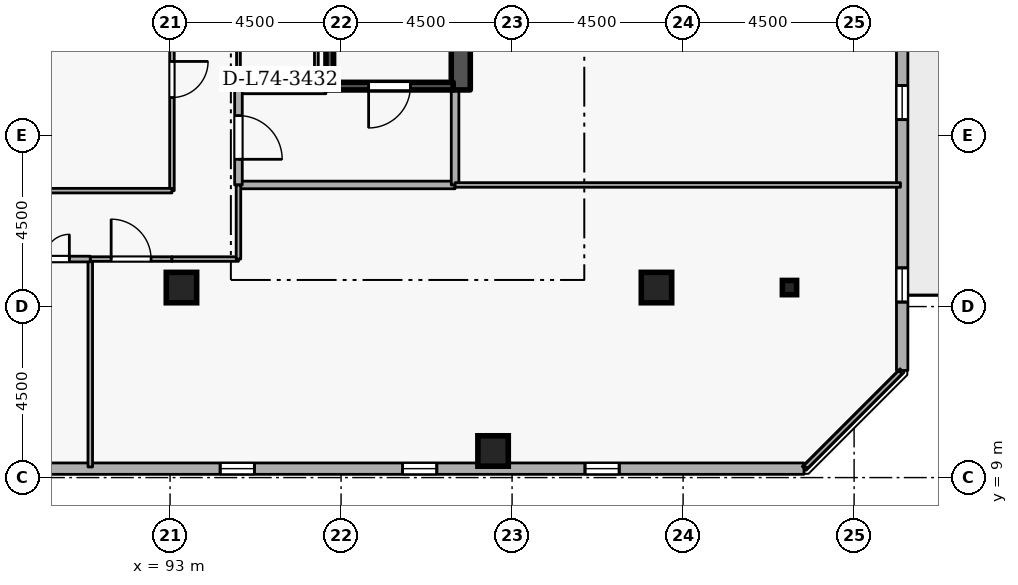
"""IFC4 building model, lengths in metres.
Left out: names, types, materials, properties, quantities, classifications, styles, units other than length and angle.
Written with IfcOpenShell. Run it as: python <this file> out.ifc"""

import sys

from ifc_helpers import new_model, si_unit, direction, frame, frame_2d, origin, origin_2d, place, context, subcontext, project, spatial, rectangle, i_section, extrude, element, fill, save


model = new_model("IFC4")
c1 = context("Model", 3, precision=1e-05, world=origin(), true_north=direction((0.0, 1.0)))
c2 = subcontext(c1, "Body", "Model", "MODEL_VIEW")
j1 = project(units=[si_unit("LENGTHUNIT", "METRE"), si_unit("PLANEANGLEUNIT", "RADIAN")], contexts=[c1])
p1 = place(None, origin())
s1 = spatial("IfcSite", under=j1, at=p1, CompositionType="ELEMENT")
p2 = place(p1, origin())
s2 = spatial("IfcBuilding", under=s1, at=p2, CompositionType="ELEMENT")
p3 = place(p2, frame((0.0, 0.0, 276.3)))
s3 = spatial("IfcBuildingStorey", under=s2, at=p3, CompositionType="ELEMENT", Elevation=276.3)
p4 = place(p3, frame((100.65, 19.2, 0.0), z_axis=(0.0, 0.0, 1.0), x_axis=(0.0, 1.0, 0.0)))
e1 = element("IfcWall", 1, at=p4, inside=s3, PredefinedType="SHEAR", context=c2, shape_type="SweptSolid", body=[
    extrude(rectangle(XDim=15.6, YDim=0.5, at=frame_2d((7.8, 0.0))), origin(), (0.0, 0.0, 1.0), 3.6),
])
for number, where, z_axis, x_axis in (
    (2, (105.8, 14.0, 0.0), (0.0, 0.0, 1.0), (1.0, 0.0, 0.0)),
    (3, (101.5, 9.7, 0.0), (0.0, 0.0, 1.0), (1.0, 0.0, 0.0)),
    (4, (93.3, 14.0, 0.0), (0.0, 0.0, 1.0), (1.0, 0.0, 0.0)),
):
    element("IfcColumn", number, at=place(p3, frame(where, z_axis=z_axis, x_axis=x_axis)), inside=s3, PredefinedType="COLUMN", context=c2, shape_type="SweptSolid", body=[
        extrude(rectangle(XDim=0.8, YDim=0.8, at=origin_2d()), origin(), (0.0, 0.0, 1.0), 3.6),
    ])
p5 = place(p3, frame((109.3, 14.0, 0.0), z_axis=(0.0, 0.0, 1.0), x_axis=(1.0, 0.0, 0.0)))
e5 = element("IfcColumn", 5, at=p5, inside=s3, PredefinedType="COLUMN", context=c2, shape_type="SweptSolid", body=[
    extrude(i_section(OverallWidth=0.375, OverallDepth=0.375, WebThickness=0.017, FlangeThickness=0.027, FilletRadius=0.015, at=origin_2d()), origin(), (0.0, 0.0, 1.0), 3.6),
])
p6 = place(p3, frame((73.319, 9.235, 0.0), z_axis=(0.0, 0.0, 1.0), x_axis=(1.0, 0.0, 0.0)))
e6 = element("IfcWall", 6, at=p6, inside=s3, PredefinedType="STANDARD", context=c2, shape_type="SweptSolid", body=[
    extrude(rectangle(XDim=36.363, YDim=0.3, at=frame_2d((18.181, 0.0))), origin(), (0.0, 0.0, 1.0), 2.66),
])
p7 = place(p6, frame((6.6, 0.0, 0.72)))
e7 = element("IfcOpeningElement", 7, at=p7, cuts=e6, PredefinedType="OPENING", context=c2, shape_type="SweptSolid", body=[
    extrude(rectangle(XDim=0.9, YDim=1.75, at=frame_2d((0.45, 0.875))), frame((0.0, 0.16, 0.0), z_axis=(0.0, -1.0, 0.0), x_axis=(1.0, 0.0, 0.0)), (0.0, 0.0, 1.0), 0.32),
])
p8 = place(p6, frame((11.4, 0.0, 0.72)))
e8 = element("IfcOpeningElement", 8, at=p8, cuts=e6, PredefinedType="OPENING", context=c2, shape_type="SweptSolid", body=[
    extrude(rectangle(XDim=0.9, YDim=1.75, at=frame_2d((0.45, 0.875))), frame((0.0, 0.16, 0.0), z_axis=(0.0, -1.0, 0.0), x_axis=(1.0, 0.0, 0.0)), (0.0, 0.0, 1.0), 0.32),
])
p9 = place(p6, frame((21.0, 0.0, 0.72)))
e9 = element("IfcOpeningElement", 9, at=p9, cuts=e6, PredefinedType="OPENING", context=c2, shape_type="SweptSolid", body=[
    extrude(rectangle(XDim=0.9, YDim=1.75, at=frame_2d((0.45, 0.875))), frame((0.0, 0.16, 0.0), z_axis=(0.0, -1.0, 0.0), x_axis=(1.0, 0.0, 0.0)), (0.0, 0.0, 1.0), 0.32),
])
p10 = place(p6, frame((25.8, 0.0, 0.72)))
e10 = element("IfcOpeningElement", 10, at=p10, cuts=e6, PredefinedType="OPENING", context=c2, shape_type="SweptSolid", body=[
    extrude(rectangle(XDim=0.9, YDim=1.75, at=frame_2d((0.45, 0.875))), frame((0.0, 0.16, 0.0), z_axis=(0.0, -1.0, 0.0), x_axis=(1.0, 0.0, 0.0)), (0.0, 0.0, 1.0), 0.32),
])
p11 = place(p6, frame((30.6, 0.0, 0.72)))
e11 = element("IfcOpeningElement", 11, at=p11, cuts=e6, PredefinedType="OPENING", context=c2, shape_type="SweptSolid", body=[
    extrude(rectangle(XDim=0.9, YDim=1.75, at=frame_2d((0.45, 0.875))), frame((0.0, 0.16, 0.0), z_axis=(0.0, -1.0, 0.0), x_axis=(1.0, 0.0, 0.0)), (0.0, 0.0, 1.0), 0.32),
])
p12 = place(p3, frame((112.265, 11.819, 0.0), z_axis=(0.0, 0.0, 1.0), x_axis=(0.0, 1.0, 0.0)))
e12 = element("IfcWall", 12, at=p12, inside=s3, PredefinedType="STANDARD", context=c2, shape_type="SweptSolid", body=[
    extrude(rectangle(XDim=36.363, YDim=0.3, at=frame_2d((18.181, 0.0))), origin(), (0.0, 0.0, 1.0), 2.66),
])
p13 = place(p12, frame((23.581, 0.0, 0.0)))
e13 = element("IfcOpeningElement", 13, at=p13, cuts=e12, PredefinedType="OPENING", context=c2, shape_type="SweptSolid", body=[
    extrude(rectangle(XDim=1.0, YDim=2.08, at=frame_2d((0.5, 1.04))), frame((0.0, 0.16, 0.0), z_axis=(0.0, -1.0, 0.0), x_axis=(1.0, 0.0, 0.0)), (0.0, 0.0, 1.0), 0.32),
])
p14 = place(p12, frame((1.8, 0.0, 0.72)))
e14 = element("IfcOpeningElement", 14, at=p14, cuts=e12, PredefinedType="OPENING", context=c2, shape_type="SweptSolid", body=[
    extrude(rectangle(XDim=0.9, YDim=1.75, at=frame_2d((0.45, 0.875))), frame((0.0, 0.16, 0.0), z_axis=(0.0, -1.0, 0.0), x_axis=(1.0, 0.0, 0.0)), (0.0, 0.0, 1.0), 0.32),
])
p15 = place(p12, frame((6.6, 0.0, 0.72)))
e15 = element("IfcOpeningElement", 15, at=p15, cuts=e12, PredefinedType="OPENING", context=c2, shape_type="SweptSolid", body=[
    extrude(rectangle(XDim=0.9, YDim=1.75, at=frame_2d((0.45, 0.875))), frame((0.0, 0.16, 0.0), z_axis=(0.0, -1.0, 0.0), x_axis=(1.0, 0.0, 0.0)), (0.0, 0.0, 1.0), 0.32),
])
p16 = place(p12, frame((11.4, 0.0, 0.72)))
e16 = element("IfcOpeningElement", 16, at=p16, cuts=e12, PredefinedType="OPENING", context=c2, shape_type="SweptSolid", body=[
    extrude(rectangle(XDim=0.9, YDim=1.75, at=frame_2d((0.45, 0.875))), frame((0.0, 0.16, 0.0), z_axis=(0.0, -1.0, 0.0), x_axis=(1.0, 0.0, 0.0)), (0.0, 0.0, 1.0), 0.32),
])
p17 = place(p12, frame((16.2, 0.0, 0.72)))
e17 = element("IfcOpeningElement", 17, at=p17, cuts=e12, PredefinedType="OPENING", context=c2, shape_type="SweptSolid", body=[
    extrude(rectangle(XDim=0.9, YDim=1.75, at=frame_2d((0.45, 0.875))), frame((0.0, 0.16, 0.0), z_axis=(0.0, -1.0, 0.0), x_axis=(1.0, 0.0, 0.0)), (0.0, 0.0, 1.0), 0.32),
])
p18 = place(p12, frame((21.0, 0.0, 0.72)))
e18 = element("IfcOpeningElement", 18, at=p18, cuts=e12, PredefinedType="OPENING", context=c2, shape_type="SweptSolid", body=[
    extrude(rectangle(XDim=0.9, YDim=1.75, at=frame_2d((0.45, 0.875))), frame((0.0, 0.16, 0.0), z_axis=(0.0, -1.0, 0.0), x_axis=(1.0, 0.0, 0.0)), (0.0, 0.0, 1.0), 0.32),
])
p19 = place(p12, frame((25.8, 0.0, 0.72)))
e19 = element("IfcOpeningElement", 19, at=p19, cuts=e12, PredefinedType="OPENING", context=c2, shape_type="SweptSolid", body=[
    extrude(rectangle(XDim=0.9, YDim=1.75, at=frame_2d((0.45, 0.875))), frame((0.0, 0.16, 0.0), z_axis=(0.0, -1.0, 0.0), x_axis=(1.0, 0.0, 0.0)), (0.0, 0.0, 1.0), 0.32),
])
p20 = place(p12, frame((30.6, 0.0, 0.72)))
e20 = element("IfcOpeningElement", 20, at=p20, cuts=e12, PredefinedType="OPENING", context=c2, shape_type="SweptSolid", body=[
    extrude(rectangle(XDim=0.9, YDim=1.75, at=frame_2d((0.45, 0.875))), frame((0.0, 0.16, 0.0), z_axis=(0.0, -1.0, 0.0), x_axis=(1.0, 0.0, 0.0)), (0.0, 0.0, 1.0), 0.32),
])
p21 = place(p3, frame((100.45, 19.3, 0.0), z_axis=(0.0, 0.0, 1.0), x_axis=(-1.0, 0.0, 0.0)))
e21 = element("IfcWall", 21, at=p21, inside=s3, PredefinedType="SHEAR", context=c2, shape_type="SweptSolid", body=[
    extrude(rectangle(XDim=3.35, YDim=0.2, at=frame_2d((1.675, 0.0))), origin(), (0.0, 0.0, 1.0), 3.6),
])
p22 = place(p21, frame((1.125, 0.0, 0.0)))
e22 = element("IfcOpeningElement", 22, at=p22, cuts=e21, PredefinedType="OPENING", context=c2, shape_type="SweptSolid", body=[
    extrude(rectangle(XDim=1.1, YDim=2.1, at=frame_2d((0.55, 1.05))), frame((0.0, 0.11, 0.0), z_axis=(0.0, -1.0, 0.0), x_axis=(1.0, 0.0, 0.0)), (0.0, 0.0, 1.0), 0.22),
])
p23 = place(p3, frame((97.203, 26.55, 0.0), z_axis=(0.0, 0.0, 1.0), x_axis=(0.0, -1.0, 0.0)))
e23 = element("IfcWall", 23, at=p23, inside=s3, PredefinedType="SHEAR", context=c2, shape_type="SweptSolid", body=[
    extrude(rectangle(XDim=7.1, YDim=0.2, at=frame_2d((3.55, 0.0))), origin(), (0.0, 0.0, 1.0), 3.6),
])
p24 = place(p3, frame((94.8, 16.7, 0.0), z_axis=(0.0, 0.0, 1.0), x_axis=(1.0, 0.0, 0.0)))
e24 = element("IfcWall", 24, at=p24, inside=s3, PredefinedType="STANDARD", context=c2, shape_type="SweptSolid", body=[
    extrude(rectangle(XDim=5.7, YDim=0.2, at=frame_2d((2.85, 0.0))), origin(), (0.0, 0.0, 1.0), 3.26),
])
p25 = place(p3, frame((100.5, 16.7, 0.0), z_axis=(0.0, 0.0, 1.0), x_axis=(0.0, 1.0, 0.0)))
e25 = element("IfcWall", 25, at=p25, inside=s3, PredefinedType="STANDARD", context=c2, shape_type="SweptSolid", body=[
    extrude(rectangle(XDim=2.5, YDim=0.2, at=frame_2d((1.25, 0.0))), origin(), (0.0, 0.0, 1.0), 3.26),
])
p26 = place(p3, frame((97.1, 19.2, 0.0), z_axis=(0.0, 0.0, 1.0), x_axis=(-1.0, 0.0, 0.0)))
e26 = element("IfcWall", 26, at=p26, inside=s3, PredefinedType="STANDARD", context=c2, shape_type="SweptSolid", body=[
    extrude(rectangle(XDim=2.3, YDim=0.2, at=frame_2d((1.15, 0.0))), origin(), (0.0, 0.0, 1.0), 2.465),
])
p27 = place(p3, frame((94.8, 19.2, 0.0), z_axis=(0.0, 0.0, 1.0), x_axis=(0.0, -1.0, 0.0)))
e27 = element("IfcWall", 27, at=p27, inside=s3, PredefinedType="STANDARD", context=c2, shape_type="SweptSolid", body=[
    extrude(rectangle(XDim=2.5, YDim=0.2, at=frame_2d((1.25, 0.0))), origin(), (0.0, 0.0, 1.0), 3.26),
])
p28 = place(p27, frame((0.675, 0.0, 0.0)))
e28 = element("IfcOpeningElement", 28, at=p28, cuts=e27, PredefinedType="OPENING", context=c2, shape_type="SweptSolid", body=[
    extrude(rectangle(XDim=1.15, YDim=2.1, at=frame_2d((0.575, 1.05))), frame((0.0, 0.11, 0.0), z_axis=(0.0, -1.0, 0.0), x_axis=(1.0, 0.0, 0.0)), (0.0, 0.0, 1.0), 0.22),
])
p29 = place(p3, frame((94.8, 19.5, 0.0), z_axis=(0.0, 0.0, 1.0), x_axis=(1.0, 0.0, 0.0)))
e29 = element("IfcWall", 29, at=p29, inside=s3, PredefinedType="PARTITIONING", context=c2, shape_type="SweptSolid", body=[
    extrude(rectangle(XDim=2.05, YDim=0.1, at=frame_2d((1.025, 0.0))), origin(), (0.0, 0.0, 1.0), 2.465),
])
p30 = place(p3, frame((96.85, 19.5, 0.0), z_axis=(0.0, 0.0, 1.0), x_axis=(0.0, 1.0, 0.0)))
e30 = element("IfcWall", 30, at=p30, inside=s3, PredefinedType="PARTITIONING", context=c2, shape_type="SweptSolid", body=[
    extrude(rectangle(XDim=2.6, YDim=0.1, at=frame_2d((1.3, 0.0))), origin(), (0.0, 0.0, 1.0), 3.26),
])
p31 = place(p3, frame((94.8, 22.1, 0.0), z_axis=(0.0, 0.0, 1.0), x_axis=(0.0, -1.0, 0.0)))
e31 = element("IfcWall", 31, at=p31, inside=s3, PredefinedType="PARTITIONING", context=c2, shape_type="SweptSolid", body=[
    extrude(rectangle(XDim=2.6, YDim=0.1, at=frame_2d((1.3, 0.0))), origin(), (0.0, 0.0, 1.0), 3.26),
])
p32 = place(p31, frame((0.825, 0.0, 0.0)))
e32 = element("IfcOpeningElement", 32, at=p32, cuts=e31, PredefinedType="OPENING", context=c2, shape_type="SweptSolid", body=[
    extrude(rectangle(XDim=0.95, YDim=2.1, at=frame_2d((0.475, 1.05))), frame((0.0, 0.06, 0.0), z_axis=(0.0, -1.0, 0.0), x_axis=(1.0, 0.0, 0.0)), (0.0, 0.0, 1.0), 0.12),
])
p33 = place(p3, frame((90.9, 9.28, 0.0), z_axis=(0.0, 0.0, 1.0), x_axis=(0.0, 1.0, 0.0)))
e33 = element("IfcWall", 33, at=p33, inside=s3, PredefinedType="PARTITIONING", context=c2, shape_type="SweptSolid", body=[
    extrude(rectangle(XDim=5.47, YDim=0.12, at=frame_2d((2.735, 0.0))), origin(), (0.0, 0.0, 1.0), 3.26),
])
p34 = place(p3, frame((90.9, 14.75, 0.0), z_axis=(0.0, 0.0, 1.0), x_axis=(1.0, 0.0, 0.0)))
e34 = element("IfcWall", 34, at=p34, inside=s3, PredefinedType="PARTITIONING", context=c2, shape_type="SweptSolid", body=[
    extrude(rectangle(XDim=2.15, YDim=0.12, at=frame_2d((1.075, 0.0))), origin(), (0.0, 0.0, 1.0), 3.26),
])
p35 = place(p34, frame((0.55, 0.0, 0.0)))
e35 = element("IfcOpeningElement", 35, at=p35, cuts=e34, PredefinedType="OPENING", context=c2, shape_type="SweptSolid", body=[
    extrude(rectangle(XDim=1.05, YDim=2.1, at=frame_2d((0.525, 1.05))), frame((0.0, 0.07, 0.0), z_axis=(0.0, -1.0, 0.0), x_axis=(1.0, 0.0, 0.0)), (0.0, 0.0, 1.0), 0.14),
])
p36 = place(p3, frame((93.05, 14.75, 0.0), z_axis=(0.0, 0.0, 1.0), x_axis=(1.0, 0.0, 0.0)))
e36 = element("IfcWall", 36, at=p36, inside=s3, PredefinedType="PARTITIONING", context=c2, shape_type="SweptSolid", body=[
    extrude(rectangle(XDim=1.75, YDim=0.12, at=frame_2d((0.875, 0.0))), origin(), (0.0, 0.0, 1.0), 3.26),
])
p37 = place(p3, frame((94.8, 14.75, 0.0), z_axis=(0.0, 0.0, 1.0), x_axis=(0.0, 1.0, 0.0)))
e37 = element("IfcWall", 37, at=p37, inside=s3, PredefinedType="PARTITIONING", context=c2, shape_type="SweptSolid", body=[
    extrude(rectangle(XDim=1.95, YDim=0.12, at=frame_2d((0.975, 0.0))), origin(), (0.0, 0.0, 1.0), 3.26),
])
p38 = place(p3, frame((100.5, 16.7, 0.0), z_axis=(0.0, 0.0, 1.0), x_axis=(1.0, 0.0, 0.0)))
e38 = element("IfcWall", 38, at=p38, inside=s3, PredefinedType="PARTITIONING", context=c2, shape_type="SweptSolid", body=[
    extrude(rectangle(XDim=11.72, YDim=0.12, at=frame_2d((5.86, 0.0))), origin(), (0.0, 0.0, 1.0), 3.26),
])
p39 = place(p3, frame((112.22, 11.775, 0.0), z_axis=(0.0, 0.0, 1.0), x_axis=(-0.707106781187, -0.707106781187, 0.0)))
e39 = element("IfcWall", 39, at=p39, inside=s3, PredefinedType="PARTITIONING", context=c2, shape_type="SweptSolid", body=[
    extrude(rectangle(XDim=3.528, YDim=0.12, at=frame_2d((1.764, 0.0))), origin(), (0.0, 0.0, 1.0), 3.26),
])
p40 = place(p3, frame((88.5, 14.75, 0.0), z_axis=(0.0, 0.0, 1.0), x_axis=(1.0, 0.0, 0.0)))
e40 = element("IfcWall", 40, at=p40, inside=s3, PredefinedType="PARTITIONING", context=c2, shape_type="SweptSolid", body=[
    extrude(rectangle(XDim=2.4, YDim=0.15, at=frame_2d((1.2, 0.0))), origin(), (0.0, 0.0, 1.0), 3.26),
])
p41 = place(p40, frame((0.55, 0.0, 0.0)))
e41 = element("IfcOpeningElement", 41, at=p41, cuts=e40, PredefinedType="OPENING", context=c2, shape_type="SweptSolid", body=[
    extrude(rectangle(XDim=1.3, YDim=2.12, at=frame_2d((0.65, 1.06))), frame((0.0, 0.085, 0.0), z_axis=(0.0, -1.0, 0.0), x_axis=(1.0, 0.0, 0.0)), (0.0, 0.0, 1.0), 0.17),
])
p42 = place(p3, frame((93.05, 22.4, 0.0), z_axis=(0.0, 0.0, 1.0), x_axis=(0.0, -1.0, 0.0)))
e42 = element("IfcWall", 42, at=p42, inside=s3, PredefinedType="PARTITIONING", context=c2, shape_type="SweptSolid", body=[
    extrude(rectangle(XDim=5.85, YDim=0.12, at=frame_2d((2.925, 0.0))), origin(), (0.0, 0.0, 1.0), 3.26),
])
p43 = place(p42, frame((2.45, 0.0, 0.0)))
e43 = element("IfcOpeningElement", 43, at=p43, cuts=e42, PredefinedType="OPENING", context=c2, shape_type="SweptSolid", body=[
    extrude(rectangle(XDim=0.95, YDim=2.1, at=frame_2d((0.475, 1.05))), frame((0.0, 0.07, 0.0), z_axis=(0.0, -1.0, 0.0), x_axis=(1.0, 0.0, 0.0)), (0.0, 0.0, 1.0), 0.14),
])
p44 = place(p3, frame((93.05, 16.55, 0.0), z_axis=(0.0, 0.0, 1.0), x_axis=(-1.0, 0.0, 0.0)))
e44 = element("IfcWall", 44, at=p44, inside=s3, PredefinedType="PARTITIONING", context=c2, shape_type="SweptSolid", body=[
    extrude(rectangle(XDim=3.75, YDim=0.12, at=frame_2d((1.875, 0.0))), origin(), (0.0, 0.0, 1.0), 3.26),
])
p45 = place(p9, origin())
e45 = element("IfcWindow", 45, at=p45, inside=s3, PartitioningType="SINGLE_PANEL", PredefinedType="WINDOW", context=c2, shape_type="SweptSolid", body=[
    extrude(rectangle(XDim=0.9, YDim=1.75, at=frame_2d((0.45, 0.875))), frame((0.0, 0.03, 0.0), z_axis=(0.0, -1.0, 0.0), x_axis=(1.0, 0.0, 0.0)), (0.0, 0.0, 1.0), 0.06),
])
fill(e9, e45)
p46 = place(p10, origin())
e46 = element("IfcWindow", 46, at=p46, inside=s3, PartitioningType="SINGLE_PANEL", PredefinedType="WINDOW", context=c2, shape_type="SweptSolid", body=[
    extrude(rectangle(XDim=0.9, YDim=1.75, at=frame_2d((0.45, 0.875))), frame((0.0, 0.03, 0.0), z_axis=(0.0, -1.0, 0.0), x_axis=(1.0, 0.0, 0.0)), (0.0, 0.0, 1.0), 0.06),
])
fill(e10, e46)
p47 = place(p11, origin())
e47 = element("IfcWindow", 47, at=p47, inside=s3, PartitioningType="SINGLE_PANEL", PredefinedType="WINDOW", context=c2, shape_type="SweptSolid", body=[
    extrude(rectangle(XDim=0.9, YDim=1.75, at=frame_2d((0.45, 0.875))), frame((0.0, 0.03, 0.0), z_axis=(0.0, -1.0, 0.0), x_axis=(1.0, 0.0, 0.0)), (0.0, 0.0, 1.0), 0.06),
])
fill(e11, e47)
p48 = place(p14, origin())
e48 = element("IfcWindow", 48, at=p48, inside=s3, PartitioningType="SINGLE_PANEL", PredefinedType="WINDOW", context=c2, shape_type="SweptSolid", body=[
    extrude(rectangle(XDim=0.9, YDim=1.75, at=frame_2d((0.45, 0.875))), frame((0.0, 0.03, 0.0), z_axis=(0.0, -1.0, 0.0), x_axis=(1.0, 0.0, 0.0)), (0.0, 0.0, 1.0), 0.06),
])
fill(e14, e48)
p49 = place(p15, origin())
e49 = element("IfcWindow", 49, at=p49, inside=s3, PartitioningType="SINGLE_PANEL", PredefinedType="WINDOW", context=c2, shape_type="SweptSolid", body=[
    extrude(rectangle(XDim=0.9, YDim=1.75, at=frame_2d((0.45, 0.875))), frame((0.0, 0.03, 0.0), z_axis=(0.0, -1.0, 0.0), x_axis=(1.0, 0.0, 0.0)), (0.0, 0.0, 1.0), 0.06),
])
fill(e15, e49)
p50 = place(p22, origin())
e50 = element("IfcDoor", 50, at=p50, inside=s3, OperationType="SINGLE_SWING_RIGHT", PredefinedType="DOOR", context=c2, shape_type="SweptSolid", body=[
    extrude(rectangle(XDim=1.1, YDim=2.1, at=frame_2d((0.55, 1.05))), frame((0.0, 0.025, 0.0), z_axis=(0.0, -1.0, 0.0), x_axis=(1.0, 0.0, 0.0)), (0.0, 0.0, 1.0), 0.05),
])
fill(e22, e50)
p51 = place(p28, origin())
e51 = element("IfcDoor", 51, at=p51, inside=s3, OperationType="SINGLE_SWING_RIGHT", PredefinedType="DOOR", context=c2, shape_type="SweptSolid", body=[
    extrude(rectangle(XDim=1.15, YDim=2.1, at=frame_2d((0.575, 1.05))), frame((0.0, 0.025, 0.0), z_axis=(0.0, -1.0, 0.0), x_axis=(1.0, 0.0, 0.0)), (0.0, 0.0, 1.0), 0.05),
])
fill(e28, e51)
p52 = place(p35, origin())
e52 = element("IfcDoor", 52, at=p52, inside=s3, OperationType="SINGLE_SWING_LEFT", PredefinedType="DOOR", context=c2, shape_type="SweptSolid", body=[
    extrude(rectangle(XDim=1.05, YDim=2.1, at=frame_2d((0.525, 1.05))), frame((0.0, 0.025, 0.0), z_axis=(0.0, -1.0, 0.0), x_axis=(1.0, 0.0, 0.0)), (0.0, 0.0, 1.0), 0.05),
])
fill(e35, e52)
p53 = place(p41, origin())
e53 = element("IfcDoor", 53, at=p53, inside=s3, OperationType="DOUBLE_DOOR_SINGLE_SWING", PredefinedType="DOOR", context=c2, shape_type="SweptSolid", body=[
    extrude(rectangle(XDim=1.3, YDim=2.12, at=frame_2d((0.65, 1.06))), frame((0.0, 0.025, 0.0), z_axis=(0.0, -1.0, 0.0), x_axis=(1.0, 0.0, 0.0)), (0.0, 0.0, 1.0), 0.05),
])
fill(e41, e53)
p54 = place(p43, origin())
e54 = element("IfcDoor", 54, at=p54, inside=s3, OperationType="SINGLE_SWING_LEFT", PredefinedType="DOOR", context=c2, shape_type="SweptSolid", body=[
    extrude(rectangle(XDim=0.95, YDim=2.1, at=frame_2d((0.475, 1.05))), frame((0.0, 0.025, 0.0), z_axis=(0.0, -1.0, 0.0), x_axis=(1.0, 0.0, 0.0)), (0.0, 0.0, 1.0), 0.05),
])
fill(e43, e54)
save(model, sys.argv[1])
